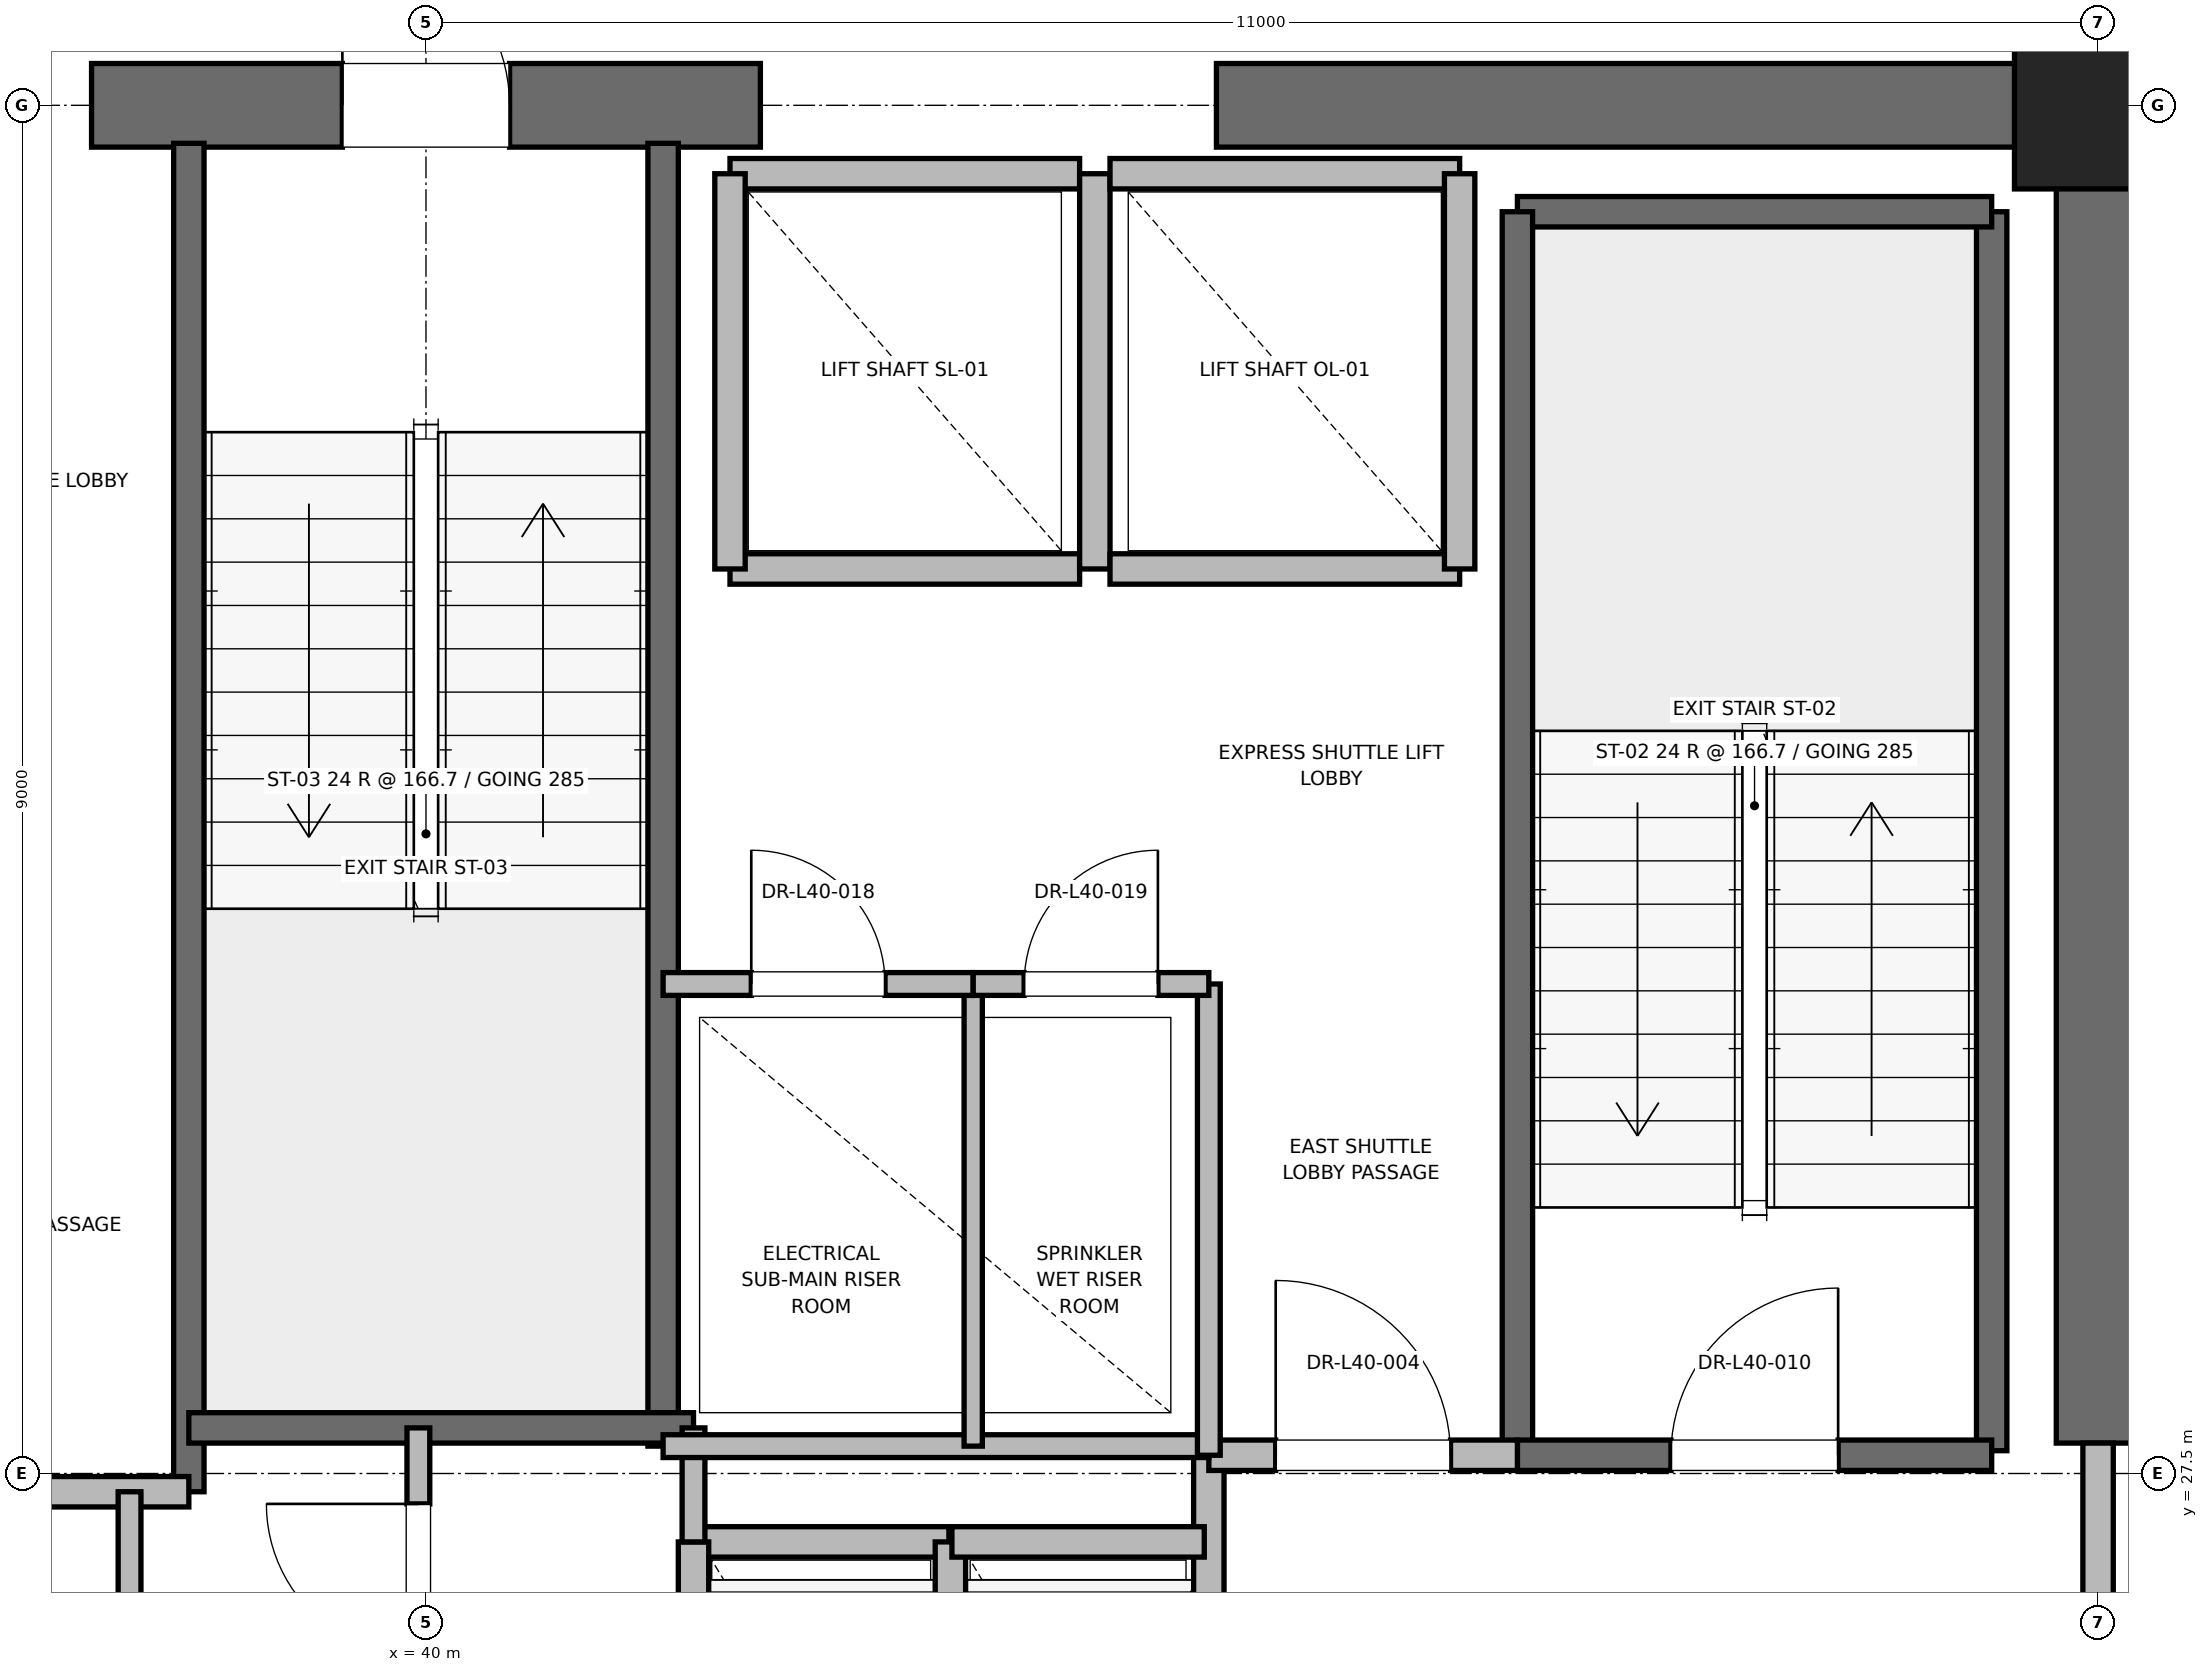
"""IFC4 building model, lengths in metres.
Left out: names, types, materials, properties, quantities, classifications, styles, units other than length and angle.
Written with IfcOpenShell. Run it as: python <this file> out.ifc"""

import sys

from ifc_helpers import new_model, si_unit, direction, frame, frame_2d, origin, origin_2d, place, context, subcontext, project, spatial, rectangle, extrude, element, fill, save


model = new_model("IFC4")
c1 = context("Model", 3, precision=1e-05, world=origin(), true_north=direction((0.0, 1.0)))
c2 = subcontext(c1, "Body", "Model", "MODEL_VIEW")
j1 = project(units=[si_unit("LENGTHUNIT", "METRE"), si_unit("PLANEANGLEUNIT", "RADIAN")], contexts=[c1])
p1 = place(None, origin())
s1 = spatial("IfcSite", under=j1, at=p1, CompositionType="ELEMENT")
p2 = place(p1, origin())
s2 = spatial("IfcBuilding", under=s1, at=p2, CompositionType="ELEMENT")
p3 = place(p2, frame((0.0, 0.0, 172.4)))
s3 = spatial("IfcBuildingStorey", under=s2, at=p3, CompositionType="ELEMENT", Elevation=172.4)
p4 = place(p3, frame((51.0, 36.5, 0.0), z_axis=(0.0, 0.0, 1.0), x_axis=(1.0, 0.0, 0.0)))
e1 = element("IfcColumn", 1, at=p4, inside=s3, PredefinedType="PILASTER", context=c2, shape_type="SweptSolid", body=[
    extrude(rectangle(XDim=1.1, YDim=1.1, at=origin_2d()), origin(), (0.0, 0.0, 1.0), 4.0),
])
p5 = place(p3, frame((37.8, 36.5, 0.0), z_axis=(0.0, 0.0, 1.0), x_axis=(1.0, 0.0, 0.0)))
e2 = element("IfcWall", 2, at=p5, inside=s3, PredefinedType="SHEAR", context=c2, shape_type="SweptSolid", body=[
    extrude(rectangle(XDim=4.4, YDim=0.55, at=frame_2d((2.2, 0.0))), origin(), (0.0, 0.0, 1.0), 3.775),
])
p6 = place(p5, frame((1.65, 0.0, 0.0)))
e3 = element("IfcOpeningElement", 3, at=p6, cuts=e2, PredefinedType="OPENING", context=c2, shape_type="SweptSolid", body=[
    extrude(rectangle(XDim=1.1, YDim=2.15, at=frame_2d((0.55, 1.075))), frame((0.0, 0.275, 0.0), z_axis=(0.0, -1.0, 0.0), x_axis=(1.0, 0.0, 0.0)), (0.0, 0.0, 1.0), 0.55),
])
p7 = place(p3, frame((45.2, 36.5, 0.0), z_axis=(0.0, 0.0, 1.0), x_axis=(1.0, 0.0, 0.0)))
e4 = element("IfcWall", 4, at=p7, inside=s3, PredefinedType="SHEAR", context=c2, shape_type="SweptSolid", body=[
    extrude(rectangle(XDim=5.8, YDim=0.55, at=frame_2d((2.9, 0.0))), origin(), (0.0, 0.0, 1.0), 3.775),
])
p8 = place(p3, frame((51.0, 27.7, 0.0), z_axis=(0.0, 0.0, 1.0), x_axis=(0.0, 1.0, 0.0)))
e5 = element("IfcWall", 5, at=p8, inside=s3, PredefinedType="SHEAR", context=c2, shape_type="SweptSolid", body=[
    extrude(rectangle(XDim=8.8, YDim=0.55, at=frame_2d((4.4, 0.0))), origin(), (0.0, 0.0, 1.0), 3.775),
])
p9 = place(p3, frame((50.3, 27.65, 0.0), z_axis=(0.0, 0.0, 1.0), x_axis=(0.0, 1.0, 0.0)))
e6 = element("IfcWall", 6, at=p9, inside=s3, PredefinedType="SOLIDWALL", context=c2, shape_type="SweptSolid", body=[
    extrude(rectangle(XDim=8.15, YDim=0.2, at=frame_2d((4.075, 0.0))), origin(), (0.0, 0.0, 1.0), 3.775),
])
p10 = place(p3, frame((47.18, 35.8, 0.0), z_axis=(0.0, 0.0, 1.0), x_axis=(1.0, 0.0, 0.0)))
e7 = element("IfcWall", 7, at=p10, inside=s3, PredefinedType="SOLIDWALL", context=c2, shape_type="SweptSolid", body=[
    extrude(rectangle(XDim=3.12, YDim=0.2, at=frame_2d((1.56, 0.0))), origin(), (0.0, 0.0, 1.0), 3.775),
])
p11 = place(p3, frame((47.18, 27.62, 0.0), z_axis=(0.0, 0.0, 1.0), x_axis=(0.0, 1.0, 0.0)))
e8 = element("IfcWall", 8, at=p11, inside=s3, PredefinedType="SOLIDWALL", context=c2, shape_type="SweptSolid", body=[
    extrude(rectangle(XDim=8.18, YDim=0.2, at=frame_2d((4.09, 0.0))), origin(), (0.0, 0.0, 1.0), 3.775),
])
p12 = place(p3, frame((47.18, 27.62, 0.0), z_axis=(0.0, 0.0, 1.0), x_axis=(1.0, 0.0, 0.0)))
e9 = element("IfcWall", 9, at=p12, inside=s3, PredefinedType="SOLIDWALL", context=c2, shape_type="SweptSolid", body=[
    extrude(rectangle(XDim=3.12, YDim=0.2, at=frame_2d((1.56, 0.0))), origin(), (0.0, 0.0, 1.0), 3.775),
])
p13 = place(p12, frame((1.01, 0.0, 0.0)))
e10 = element("IfcOpeningElement", 10, at=p13, cuts=e9, PredefinedType="OPENING", context=c2, shape_type="SweptSolid", body=[
    extrude(rectangle(XDim=1.1, YDim=2.15, at=frame_2d((0.55, 1.075))), frame((0.0, 0.1, 0.0), z_axis=(0.0, -1.0, 0.0), x_axis=(1.0, 0.0, 0.0)), (0.0, 0.0, 1.0), 0.2),
])
p14 = place(p3, frame((38.44, 27.38, 0.0), z_axis=(0.0, 0.0, 1.0), x_axis=(0.0, 1.0, 0.0)))
e11 = element("IfcWall", 11, at=p14, inside=s3, PredefinedType="SOLIDWALL", context=c2, shape_type="SweptSolid", body=[
    extrude(rectangle(XDim=8.87, YDim=0.2, at=frame_2d((4.435, 0.0))), origin(), (0.0, 0.0, 1.0), 3.775),
])
p15 = place(p3, frame((41.56, 27.68, 0.0), z_axis=(0.0, 0.0, 1.0), x_axis=(0.0, 1.0, 0.0)))
e12 = element("IfcWall", 12, at=p15, inside=s3, PredefinedType="SOLIDWALL", context=c2, shape_type="SweptSolid", body=[
    extrude(rectangle(XDim=8.57, YDim=0.2, at=frame_2d((4.285, 0.0))), origin(), (0.0, 0.0, 1.0), 3.775),
])
p16 = place(p3, frame((38.44, 27.8, 0.0), z_axis=(0.0, 0.0, 1.0), x_axis=(1.0, 0.0, 0.0)))
e13 = element("IfcWall", 13, at=p16, inside=s3, PredefinedType="SOLIDWALL", context=c2, shape_type="SweptSolid", body=[
    extrude(rectangle(XDim=3.32, YDim=0.2, at=frame_2d((1.66, 0.0))), origin(), (0.0, 0.0, 1.0), 3.775),
])
p17 = place(p3, frame((32.82, 27.38, 0.0), z_axis=(0.0, 0.0, 1.0), x_axis=(1.0, 0.0, 0.0)))
e14 = element("IfcWall", 14, at=p17, inside=s3, PredefinedType="PARTITIONING", context=c2, shape_type="SweptSolid", body=[
    extrude(rectangle(XDim=5.62, YDim=0.2, at=frame_2d((2.81, 0.0))), origin(), (0.0, 0.0, 1.0), 3.775),
])
p18 = place(p3, frame((45.15, 24.25, 0.0), z_axis=(0.0, 0.0, 1.0), x_axis=(0.0, 1.0, 0.0)))
e15 = element("IfcWall", 15, at=p18, inside=s3, PredefinedType="PARTITIONING", context=c2, shape_type="SweptSolid", body=[
    extrude(rectangle(XDim=3.37, YDim=0.2, at=frame_2d((1.685, 0.0))), origin(), (0.0, 0.0, 1.0), 3.775),
])
p19 = place(p3, frame((45.15, 27.62, 0.0), z_axis=(0.0, 0.0, 1.0), x_axis=(1.0, 0.0, 0.0)))
e16 = element("IfcWall", 16, at=p19, inside=s3, PredefinedType="PARTITIONING", context=c2, shape_type="SweptSolid", body=[
    extrude(rectangle(XDim=2.03, YDim=0.2, at=frame_2d((1.015, 0.0))), origin(), (0.0, 0.0, 1.0), 3.775),
])
p20 = place(p19, frame((0.44, 0.0, 0.0)))
e17 = element("IfcOpeningElement", 17, at=p20, cuts=e16, PredefinedType="OPENING", context=c2, shape_type="SweptSolid", body=[
    extrude(rectangle(XDim=1.15, YDim=2.2, at=frame_2d((0.575, 1.1))), frame((0.0, 0.1, 0.0), z_axis=(0.0, -1.0, 0.0), x_axis=(1.0, 0.0, 0.0)), (0.0, 0.0, 1.0), 0.2),
])
p21 = place(p3, frame((51.0, 24.3, 0.0), z_axis=(0.0, 0.0, 1.0), x_axis=(0.0, 1.0, 0.0)))
e18 = element("IfcWall", 18, at=p21, inside=s3, PredefinedType="PARTITIONING", context=c2, shape_type="SweptSolid", body=[
    extrude(rectangle(XDim=3.4, YDim=0.2, at=frame_2d((1.7, 0.0))), origin(), (0.0, 0.0, 1.0), 2.755),
])
p22 = place(p21, frame((1.125, 0.0, 0.0)))
e19 = element("IfcOpeningElement", 19, at=p22, cuts=e18, PredefinedType="OPENING", context=c2, shape_type="SweptSolid", body=[
    extrude(rectangle(XDim=1.15, YDim=2.2, at=frame_2d((0.575, 1.1))), frame((0.0, 0.1, 0.0), z_axis=(0.0, -1.0, 0.0), x_axis=(1.0, 0.0, 0.0)), (0.0, 0.0, 1.0), 0.2),
])
p23 = place(p3, frame((43.44, 27.05, 0.0), z_axis=(0.0, 0.0, 1.0), x_axis=(-1.0, 0.0, 0.0)))
e20 = element("IfcWall", 20, at=p23, inside=s3, PredefinedType="SOLIDWALL", context=c2, shape_type="SweptSolid", body=[
    extrude(rectangle(XDim=1.68, YDim=0.2, at=frame_2d((0.84, 0.0))), origin(), (0.0, 0.0, 1.0), 3.775),
])
for number, where, z_axis, x_axis in (
    (21, (41.76, 27.05, 0.0), (0.0, 0.0, 1.0), (0.0, -1.0, 0.0)),
    (22, (43.45, 24.45, 0.0), (0.0, 0.0, 1.0), (0.0, 1.0, 0.0)),
):
    element("IfcWall", number, at=place(p3, frame(where, z_axis=z_axis, x_axis=x_axis)), inside=s3, PredefinedType="SOLIDWALL", context=c2, shape_type="SweptSolid", body=[
        extrude(rectangle(XDim=2.6, YDim=0.2, at=frame_2d((1.3, 0.0))), origin(), (0.0, 0.0, 1.0), 3.775),
    ])
p24 = place(p3, frame((45.12, 27.05, 0.0), z_axis=(0.0, 0.0, 1.0), x_axis=(-1.0, 0.0, 0.0)))
e23 = element("IfcWall", 23, at=p24, inside=s3, PredefinedType="SOLIDWALL", context=c2, shape_type="SweptSolid", body=[
    extrude(rectangle(XDim=1.66, YDim=0.2, at=frame_2d((0.83, 0.0))), origin(), (0.0, 0.0, 1.0), 3.775),
])
p25 = place(p3, frame((42.0, 33.45, 0.0), z_axis=(0.0, 0.0, 1.0), x_axis=(1.0, 0.0, 0.0)))
e24 = element("IfcWall", 24, at=p25, inside=s3, PredefinedType="SOLIDWALL", context=c2, shape_type="SweptSolid", body=[
    extrude(rectangle(XDim=2.3, YDim=0.2, at=frame_2d((1.15, 0.0))), origin(), (0.0, 0.0, 1.0), 3.775),
])
p26 = place(p3, frame((44.3, 36.05, 0.0), z_axis=(0.0, 0.0, 1.0), x_axis=(-1.0, 0.0, 0.0)))
e25 = element("IfcWall", 25, at=p26, inside=s3, PredefinedType="SOLIDWALL", context=c2, shape_type="SweptSolid", body=[
    extrude(rectangle(XDim=2.3, YDim=0.2, at=frame_2d((1.15, 0.0))), origin(), (0.0, 0.0, 1.0), 2.755),
])
for number, where, z_axis, x_axis in (
    (26, (42.0, 36.05, 0.0), (0.0, 0.0, 1.0), (0.0, -1.0, 0.0)),
    (27, (44.4, 33.45, 0.0), (0.0, 0.0, 1.0), (0.0, 1.0, 0.0)),
):
    element("IfcWall", number, at=place(p3, frame(where, z_axis=z_axis, x_axis=x_axis)), inside=s3, PredefinedType="SOLIDWALL", context=c2, shape_type="SweptSolid", body=[
        extrude(rectangle(XDim=2.6, YDim=0.2, at=frame_2d((1.3, 0.0))), origin(), (0.0, 0.0, 1.0), 2.755),
    ])
p27 = place(p3, frame((44.5, 33.45, 0.0), z_axis=(0.0, 0.0, 1.0), x_axis=(1.0, 0.0, 0.0)))
e28 = element("IfcWall", 28, at=p27, inside=s3, PredefinedType="SOLIDWALL", context=c2, shape_type="SweptSolid", body=[
    extrude(rectangle(XDim=2.3, YDim=0.2, at=frame_2d((1.15, 0.0))), origin(), (0.0, 0.0, 1.0), 3.775),
])
p28 = place(p3, frame((46.8, 36.05, 0.0), z_axis=(0.0, 0.0, 1.0), x_axis=(-1.0, 0.0, 0.0)))
e29 = element("IfcWall", 29, at=p28, inside=s3, PredefinedType="SOLIDWALL", context=c2, shape_type="SweptSolid", body=[
    extrude(rectangle(XDim=2.3, YDim=0.2, at=frame_2d((1.15, 0.0))), origin(), (0.0, 0.0, 1.0), 2.755),
])
p29 = place(p3, frame((46.8, 33.45, 0.0), z_axis=(0.0, 0.0, 1.0), x_axis=(0.0, 1.0, 0.0)))
e30 = element("IfcWall", 30, at=p29, inside=s3, PredefinedType="SOLIDWALL", context=c2, shape_type="SweptSolid", body=[
    extrude(rectangle(XDim=2.6, YDim=0.2, at=frame_2d((1.3, 0.0))), origin(), (0.0, 0.0, 1.0), 3.775),
])
p30 = place(p3, frame((41.76, 27.05, 0.0), z_axis=(0.0, 0.0, 1.0), x_axis=(0.0, 1.0, 0.0)))
e31 = element("IfcWall", 31, at=p30, inside=s3, PredefinedType="PARTITIONING", context=c2, shape_type="SweptSolid", body=[
    extrude(rectangle(XDim=0.75, YDim=0.15, at=frame_2d((0.375, 0.0))), origin(), (0.0, 0.0, 1.0), 2.85),
])
p31 = place(p3, frame((39.95, 25.8, 0.0), z_axis=(0.0, 0.0, 1.0), x_axis=(0.0, 1.0, 0.0)))
e32 = element("IfcWall", 32, at=p31, inside=s3, PredefinedType="PARTITIONING", context=c2, shape_type="SweptSolid", body=[
    extrude(rectangle(XDim=2.0, YDim=0.15, at=frame_2d((1.0, 0.0))), origin(), (0.0, 0.0, 1.0), 2.85),
])
p32 = place(p31, frame((0.5, 0.0, 0.0)))
e33 = element("IfcOpeningElement", 33, at=p32, cuts=e32, PredefinedType="OPENING", context=c2, shape_type="SweptSolid", body=[
    extrude(rectangle(XDim=1.0, YDim=2.15, at=frame_2d((0.5, 1.075))), frame((0.0, 0.075, 0.0), z_axis=(0.0, -1.0, 0.0), x_axis=(1.0, 0.0, 0.0)), (0.0, 0.0, 1.0), 0.15),
])
p33 = place(p3, frame((38.05, 24.5, 0.0), z_axis=(0.0, 0.0, 1.0), x_axis=(0.0, 1.0, 0.0)))
e34 = element("IfcWall", 34, at=p33, inside=s3, PredefinedType="PARTITIONING", context=c2, shape_type="SweptSolid", body=[
    extrude(rectangle(XDim=2.88, YDim=0.15, at=frame_2d((1.44, 0.0))), origin(), (0.0, 0.0, 1.0), 2.85),
])
p34 = place(p33, frame((0.94, 0.0, 0.0)))
e35 = element("IfcOpeningElement", 35, at=p34, cuts=e34, PredefinedType="OPENING", context=c2, shape_type="SweptSolid", body=[
    extrude(rectangle(XDim=1.0, YDim=2.15, at=frame_2d((0.5, 1.075))), frame((0.0, 0.075, 0.0), z_axis=(0.0, -1.0, 0.0), x_axis=(1.0, 0.0, 0.0)), (0.0, 0.0, 1.0), 0.15),
])
p35 = place(p3, frame((41.56, 27.68, 0.0), z_axis=(0.0, 0.0, 1.0), x_axis=(1.0, 0.0, 0.0)))
e36 = element("IfcWall", 36, at=p35, inside=s3, PredefinedType="PARTITIONING", context=c2, shape_type="SweptSolid", body=[
    extrude(rectangle(XDim=3.59, YDim=0.15, at=frame_2d((1.795, 0.0))), origin(), (0.0, 0.0, 1.0), 2.85),
])
p36 = place(p3, frame((45.15, 27.62, 0.0), z_axis=(0.0, 0.0, 1.0), x_axis=(0.0, 1.0, 0.0)))
e37 = element("IfcWall", 37, at=p36, inside=s3, PredefinedType="PARTITIONING", context=c2, shape_type="SweptSolid", body=[
    extrude(rectangle(XDim=3.1, YDim=0.15, at=frame_2d((1.55, 0.0))), origin(), (0.0, 0.0, 1.0), 2.85),
])
p37 = place(p3, frame((43.6, 27.68, 0.0), z_axis=(0.0, 0.0, 1.0), x_axis=(0.0, 1.0, 0.0)))
e38 = element("IfcWall", 38, at=p37, inside=s3, PredefinedType="PARTITIONING", context=c2, shape_type="SweptSolid", body=[
    extrude(rectangle(XDim=3.04, YDim=0.12, at=frame_2d((1.52, 0.0))), origin(), (0.0, 0.0, 1.0), 2.85),
])
p38 = place(p3, frame((41.56, 30.72, 0.0), z_axis=(0.0, 0.0, 1.0), x_axis=(1.0, 0.0, 0.0)))
e39 = element("IfcWall", 39, at=p38, inside=s3, PredefinedType="PARTITIONING", context=c2, shape_type="SweptSolid", body=[
    extrude(rectangle(XDim=2.04, YDim=0.15, at=frame_2d((1.02, 0.0))), origin(), (0.0, 0.0, 1.0), 2.85),
])
p39 = place(p38, frame((0.58, 0.0, 0.0)))
e40 = element("IfcOpeningElement", 40, at=p39, cuts=e39, PredefinedType="OPENING", context=c2, shape_type="SweptSolid", body=[
    extrude(rectangle(XDim=0.88, YDim=2.1, at=frame_2d((0.44, 1.05))), frame((0.0, 0.075, 0.0), z_axis=(0.0, -1.0, 0.0), x_axis=(1.0, 0.0, 0.0)), (0.0, 0.0, 1.0), 0.15),
])
p40 = place(p3, frame((43.6, 30.72, 0.0), z_axis=(0.0, 0.0, 1.0), x_axis=(1.0, 0.0, 0.0)))
e41 = element("IfcWall", 41, at=p40, inside=s3, PredefinedType="PARTITIONING", context=c2, shape_type="SweptSolid", body=[
    extrude(rectangle(XDim=1.55, YDim=0.15, at=frame_2d((0.775, 0.0))), origin(), (0.0, 0.0, 1.0), 2.85),
])
p41 = place(p40, frame((0.335, 0.0, 0.0)))
e42 = element("IfcOpeningElement", 42, at=p41, cuts=e41, PredefinedType="OPENING", context=c2, shape_type="SweptSolid", body=[
    extrude(rectangle(XDim=0.88, YDim=2.1, at=frame_2d((0.44, 1.05))), frame((0.0, 0.075, 0.0), z_axis=(0.0, -1.0, 0.0), x_axis=(1.0, 0.0, 0.0)), (0.0, 0.0, 1.0), 0.15),
])
p42 = place(p13, origin())
e43 = element("IfcDoor", 43, at=p42, inside=s3, OperationType="SINGLE_SWING_RIGHT", PredefinedType="DOOR", context=c2, shape_type="SweptSolid", body=[
    extrude(rectangle(XDim=1.1, YDim=2.15, at=frame_2d((0.55, 1.075))), frame((0.0, 0.025, 0.0), z_axis=(0.0, -1.0, 0.0), x_axis=(1.0, 0.0, 0.0)), (0.0, 0.0, 1.0), 0.05),
])
fill(e10, e43)
p43 = place(p6, origin())
e44 = element("IfcDoor", 44, at=p43, inside=s3, OperationType="SINGLE_SWING_LEFT", PredefinedType="DOOR", context=c2, shape_type="SweptSolid", body=[
    extrude(rectangle(XDim=1.1, YDim=2.15, at=frame_2d((0.55, 1.075))), frame((0.0, 0.025, 0.0), z_axis=(0.0, -1.0, 0.0), x_axis=(1.0, 0.0, 0.0)), (0.0, 0.0, 1.0), 0.05),
])
fill(e3, e44)
p44 = place(p20, origin())
e45 = element("IfcDoor", 45, at=p44, inside=s3, OperationType="SINGLE_SWING_LEFT", PredefinedType="DOOR", context=c2, shape_type="SweptSolid", body=[
    extrude(rectangle(XDim=1.15, YDim=2.2, at=frame_2d((0.575, 1.1))), frame((0.0, 0.025, 0.0), z_axis=(0.0, -1.0, 0.0), x_axis=(1.0, 0.0, 0.0)), (0.0, 0.0, 1.0), 0.05),
])
fill(e17, e45)
p45 = place(p32, origin())
e46 = element("IfcDoor", 46, at=p45, inside=s3, OperationType="SINGLE_SWING_RIGHT", PredefinedType="DOOR", context=c2, shape_type="SweptSolid", body=[
    extrude(rectangle(XDim=1.0, YDim=2.15, at=frame_2d((0.5, 1.075))), frame((0.0, 0.025, 0.0), z_axis=(0.0, -1.0, 0.0), x_axis=(1.0, 0.0, 0.0)), (0.0, 0.0, 1.0), 0.05),
])
fill(e33, e46)
p46 = place(p39, origin())
e47 = element("IfcDoor", 47, at=p46, inside=s3, OperationType="SINGLE_SWING_LEFT", PredefinedType="DOOR", context=c2, shape_type="SweptSolid", body=[
    extrude(rectangle(XDim=0.88, YDim=2.1, at=frame_2d((0.44, 1.05))), frame((0.0, 0.025, 0.0), z_axis=(0.0, -1.0, 0.0), x_axis=(1.0, 0.0, 0.0)), (0.0, 0.0, 1.0), 0.05),
])
fill(e40, e47)
p47 = place(p41, origin())
e48 = element("IfcDoor", 48, at=p47, inside=s3, OperationType="SINGLE_SWING_RIGHT", PredefinedType="DOOR", context=c2, shape_type="SweptSolid", body=[
    extrude(rectangle(XDim=0.88, YDim=2.1, at=frame_2d((0.44, 1.05))), frame((0.0, 0.025, 0.0), z_axis=(0.0, -1.0, 0.0), x_axis=(1.0, 0.0, 0.0)), (0.0, 0.0, 1.0), 0.05),
])
fill(e42, e48)
save(model, sys.argv[1])
